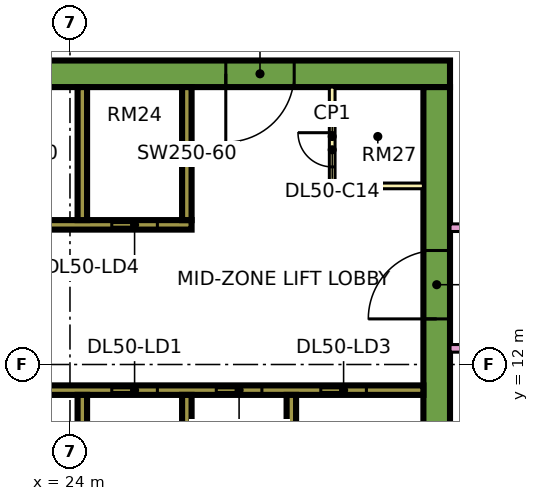
"""IFC4 building model, lengths in metres.
Left out: names, types, materials, properties, quantities, classifications, styles, units other than length and angle.
Written with IfcOpenShell. Run it as: python <this file> out.ifc"""

import sys

from ifc_helpers import new_model, si_unit, direction, frame, frame_2d, origin, place, context, subcontext, project, spatial, rectangle, extrude, element, fill, save


model = new_model("IFC4")
c1 = context("Model", 3, precision=1e-05, world=origin(), true_north=direction((0.0, 1.0)))
c2 = subcontext(c1, "Body", "Model", "MODEL_VIEW")
j1 = project(units=[si_unit("LENGTHUNIT", "METRE"), si_unit("PLANEANGLEUNIT", "RADIAN")], contexts=[c1])
p1 = place(None, origin())
s1 = spatial("IfcSite", under=j1, at=p1, CompositionType="ELEMENT")
p2 = place(p1, origin())
s2 = spatial("IfcBuilding", under=s1, at=p2, CompositionType="ELEMENT")
p3 = place(p2, frame((0.0, 0.0, 215.4)))
s3 = spatial("IfcBuildingStorey", under=s2, at=p3, CompositionType="ELEMENT", Elevation=215.4)
p4 = place(p3, frame((9.0, 19.65, 0.0), z_axis=(0.0, 0.0, 1.0), x_axis=(1.0, 0.0, 0.0)))
e1 = element("IfcWall", 1, at=p4, inside=s3, PredefinedType="SHEAR", context=c2, shape_type="SweptSolid", body=[
    extrude(rectangle(XDim=25.0, YDim=0.7, at=frame_2d((12.5, 0.0))), origin(), (0.0, 0.0, 1.0), 3.75),
])
p5 = place(p4, frame((19.1, 0.0, 0.0)))
e2 = element("IfcOpeningElement", 2, at=p5, cuts=e1, PredefinedType="OPENING", context=c2, shape_type="SweptSolid", body=[
    extrude(rectangle(XDim=1.8, YDim=2.4, at=frame_2d((0.9, 1.2))), frame((0.0, 0.36, 0.0), z_axis=(0.0, -1.0, 0.0), x_axis=(1.0, 0.0, 0.0)), (0.0, 0.0, 1.0), 0.72),
])
p6 = place(p3, frame((33.65, 7.7, 0.0), z_axis=(0.0, 0.0, 1.0), x_axis=(0.0, 1.0, 0.0)))
e3 = element("IfcWall", 3, at=p6, inside=s3, PredefinedType="SHEAR", context=c2, shape_type="SweptSolid", body=[
    extrude(rectangle(XDim=11.6, YDim=0.7, at=frame_2d((5.8, 0.0))), origin(), (0.0, 0.0, 1.0), 3.75),
])
p7 = place(p6, frame((5.5, 0.0, 0.0)))
e4 = element("IfcOpeningElement", 4, at=p7, cuts=e3, PredefinedType="OPENING", context=c2, shape_type="SweptSolid", body=[
    extrude(rectangle(XDim=1.8, YDim=2.4, at=frame_2d((0.9, 1.2))), frame((0.0, 0.36, 0.0), z_axis=(0.0, -1.0, 0.0), x_axis=(1.0, 0.0, 0.0)), (0.0, 0.0, 1.0), 0.72),
])
p8 = place(p3, frame((13.45, 11.325, 0.0), z_axis=(0.0, 0.0, 1.0), x_axis=(1.0, 0.0, 0.0)))
e5 = element("IfcWall", 5, at=p8, inside=s3, PredefinedType="SHEAR", context=c2, shape_type="SweptSolid", body=[
    extrude(rectangle(XDim=19.85, YDim=0.25, at=frame_2d((9.925, 0.0))), origin(), (0.0, 0.0, 1.0), 3.75),
])
p9 = place(p8, frame((11.65, 0.0, 0.0)))
e6 = element("IfcOpeningElement", 6, at=p9, cuts=e5, PredefinedType="OPENING", context=c2, shape_type="SweptSolid", body=[
    extrude(rectangle(XDim=1.2, YDim=2.2, at=frame_2d((0.6, 1.1))), frame((0.0, 0.135, 0.0), z_axis=(0.0, -1.0, 0.0), x_axis=(1.0, 0.0, 0.0)), (0.0, 0.0, 1.0), 0.27),
])
p10 = place(p8, frame((14.4, 0.0, 0.0)))
e7 = element("IfcOpeningElement", 7, at=p10, cuts=e5, PredefinedType="OPENING", context=c2, shape_type="SweptSolid", body=[
    extrude(rectangle(XDim=1.2, YDim=2.2, at=frame_2d((0.6, 1.1))), frame((0.0, 0.135, 0.0), z_axis=(0.0, -1.0, 0.0), x_axis=(1.0, 0.0, 0.0)), (0.0, 0.0, 1.0), 0.27),
])
p11 = place(p8, frame((17.15, 0.0, 0.0)))
e8 = element("IfcOpeningElement", 8, at=p11, cuts=e5, PredefinedType="OPENING", context=c2, shape_type="SweptSolid", body=[
    extrude(rectangle(XDim=1.2, YDim=2.2, at=frame_2d((0.6, 1.1))), frame((0.0, 0.135, 0.0), z_axis=(0.0, -1.0, 0.0), x_axis=(1.0, 0.0, 0.0)), (0.0, 0.0, 1.0), 0.27),
])
p12 = place(p8, frame((1.55, 0.0, 0.0)))
e9 = element("IfcOpeningElement", 9, at=p12, cuts=e5, PredefinedType="OPENING", context=c2, shape_type="SweptSolid", body=[
    extrude(rectangle(XDim=0.9, YDim=2.1, at=frame_2d((0.45, 1.05))), frame((0.0, 0.135, 0.0), z_axis=(0.0, -1.0, 0.0), x_axis=(1.0, 0.0, 0.0)), (0.0, 0.0, 1.0), 0.27),
])
p13 = place(p8, frame((6.925, 0.0, 0.0)))
e10 = element("IfcOpeningElement", 10, at=p13, cuts=e5, PredefinedType="OPENING", context=c2, shape_type="SweptSolid", body=[
    extrude(rectangle(XDim=0.9, YDim=2.1, at=frame_2d((0.45, 1.05))), frame((0.0, 0.135, 0.0), z_axis=(0.0, -1.0, 0.0), x_axis=(1.0, 0.0, 0.0)), (0.0, 0.0, 1.0), 0.27),
])
p14 = place(p3, frame((13.45, 15.675, 0.0), z_axis=(0.0, 0.0, 1.0), x_axis=(1.0, 0.0, 0.0)))
e11 = element("IfcWall", 11, at=p14, inside=s3, PredefinedType="SHEAR", context=c2, shape_type="SweptSolid", body=[
    extrude(rectangle(XDim=13.75, YDim=0.25, at=frame_2d((6.875, 0.0))), origin(), (0.0, 0.0, 1.0), 3.75),
])
p15 = place(p14, frame((11.65, 0.0, 0.0)))
e12 = element("IfcOpeningElement", 12, at=p15, cuts=e11, PredefinedType="OPENING", context=c2, shape_type="SweptSolid", body=[
    extrude(rectangle(XDim=1.2, YDim=2.2, at=frame_2d((0.6, 1.1))), frame((0.0, 0.135, 0.0), z_axis=(0.0, -1.0, 0.0), x_axis=(1.0, 0.0, 0.0)), (0.0, 0.0, 1.0), 0.27),
])
for number, where, z_axis, x_axis in (
    (13, (24.325, 7.7, 0.0), (0.0, 0.0, 1.0), (0.0, 1.0, 0.0)),
    (14, (27.075, 7.7, 0.0), (0.0, 0.0, 1.0), (0.0, 1.0, 0.0)),
    (15, (29.825, 7.7, 0.0), (0.0, 0.0, 1.0), (0.0, 1.0, 0.0)),
    (16, (24.325, 15.8, 0.0), (0.0, 0.0, 1.0), (0.0, 1.0, 0.0)),
    (17, (27.075, 15.8, 0.0), (0.0, 0.0, 1.0), (0.0, 1.0, 0.0)),
):
    element("IfcWall", number, at=place(p3, frame(where, z_axis=z_axis, x_axis=x_axis)), inside=s3, PredefinedType="SHEAR", context=c2, shape_type="SweptSolid", body=[
        extrude(rectangle(XDim=3.5, YDim=0.25, at=frame_2d((1.75, 0.0))), origin(), (0.0, 0.0, 1.0), 3.75),
    ])
p16 = place(p3, frame((30.9, 16.7, 0.0), z_axis=(0.0, 0.0, 1.0), x_axis=(0.0, 1.0, 0.0)))
e18 = element("IfcWall", 18, at=p16, inside=s3, PredefinedType="PARTITIONING", context=c2, shape_type="SweptSolid", body=[
    extrude(rectangle(XDim=2.6, YDim=0.15, at=frame_2d((1.3, 0.0))), origin(), (0.0, 0.0, 1.0), 3.35),
])
p17 = place(p16, frame((0.5, 0.0, 0.0)))
e19 = element("IfcOpeningElement", 19, at=p17, cuts=e18, PredefinedType="OPENING", context=c2, shape_type="SweptSolid", body=[
    extrude(rectangle(XDim=0.9, YDim=2.1, at=frame_2d((0.45, 1.05))), frame((0.0, 0.085, 0.0), z_axis=(0.0, -1.0, 0.0), x_axis=(1.0, 0.0, 0.0)), (0.0, 0.0, 1.0), 0.17),
])
p18 = place(p3, frame((30.9, 16.7, 0.0), z_axis=(0.0, 0.0, 1.0), x_axis=(1.0, 0.0, 0.0)))
e20 = element("IfcWall", 20, at=p18, inside=s3, PredefinedType="PARTITIONING", context=c2, shape_type="SweptSolid", body=[
    extrude(rectangle(XDim=2.4, YDim=0.15, at=frame_2d((1.2, 0.0))), origin(), (0.0, 0.0, 1.0), 3.35),
])
p19 = place(p3, frame((34.0, 12.425, 0.0), z_axis=(0.0, 0.0, 1.0), x_axis=(1.0, 0.0, 0.0)))
e21 = element("IfcWall", 21, at=p19, inside=s3, PredefinedType="PARTITIONING", context=c2, shape_type="SweptSolid", body=[
    extrude(rectangle(XDim=2.426, YDim=0.2, at=frame_2d((1.213, 0.0))), origin(), (0.0, 0.0, 1.0), 3.35),
])
p20 = place(p3, frame((34.0, 15.6, 0.0), z_axis=(0.0, 0.0, 1.0), x_axis=(1.0, 0.0, 0.0)))
e22 = element("IfcWall", 22, at=p20, inside=s3, PredefinedType="PARTITIONING", context=c2, shape_type="SweptSolid", body=[
    extrude(rectangle(XDim=10.35, YDim=0.2, at=frame_2d((5.175, 0.0))), origin(), (0.0, 0.0, 1.0), 3.35),
])
p21 = place(p20, frame((5.6, 0.0, 0.0)))
e23 = element("IfcOpeningElement", 23, at=p21, cuts=e22, PredefinedType="OPENING", context=c2, shape_type="SweptSolid", body=[
    extrude(rectangle(XDim=1.0, YDim=2.1, at=frame_2d((0.5, 1.05))), frame((0.0, 0.11, 0.0), z_axis=(0.0, -1.0, 0.0), x_axis=(1.0, 0.0, 0.0)), (0.0, 0.0, 1.0), 0.22),
])
p22 = place(p20, frame((0.45, 0.0, 0.0)))
e24 = element("IfcOpeningElement", 24, at=p22, cuts=e22, PredefinedType="OPENING", context=c2, shape_type="SweptSolid", body=[
    extrude(rectangle(XDim=1.2, YDim=2.1, at=frame_2d((0.6, 1.05))), frame((0.0, 0.11, 0.0), z_axis=(0.0, -1.0, 0.0), x_axis=(1.0, 0.0, 0.0)), (0.0, 0.0, 1.0), 0.22),
])
p23 = place(p9, origin())
e25 = element("IfcDoor", 25, at=p23, inside=s3, OperationType="DOUBLE_DOOR_SLIDING", PredefinedType="DOOR", context=c2, shape_type="SweptSolid", body=[
    extrude(rectangle(XDim=1.2, YDim=2.2, at=frame_2d((0.6, 1.1))), frame((0.0, 0.025, 0.0), z_axis=(0.0, -1.0, 0.0), x_axis=(1.0, 0.0, 0.0)), (0.0, 0.0, 1.0), 0.05),
])
fill(e6, e25)
p24 = place(p10, origin())
e26 = element("IfcDoor", 26, at=p24, inside=s3, OperationType="DOUBLE_DOOR_SLIDING", PredefinedType="DOOR", context=c2, shape_type="SweptSolid", body=[
    extrude(rectangle(XDim=1.2, YDim=2.2, at=frame_2d((0.6, 1.1))), frame((0.0, 0.025, 0.0), z_axis=(0.0, -1.0, 0.0), x_axis=(1.0, 0.0, 0.0)), (0.0, 0.0, 1.0), 0.05),
])
fill(e7, e26)
p25 = place(p11, origin())
e27 = element("IfcDoor", 27, at=p25, inside=s3, OperationType="DOUBLE_DOOR_SLIDING", PredefinedType="DOOR", context=c2, shape_type="SweptSolid", body=[
    extrude(rectangle(XDim=1.2, YDim=2.2, at=frame_2d((0.6, 1.1))), frame((0.0, 0.025, 0.0), z_axis=(0.0, -1.0, 0.0), x_axis=(1.0, 0.0, 0.0)), (0.0, 0.0, 1.0), 0.05),
])
fill(e8, e27)
p26 = place(p15, origin())
e28 = element("IfcDoor", 28, at=p26, inside=s3, OperationType="DOUBLE_DOOR_SLIDING", PredefinedType="DOOR", context=c2, shape_type="SweptSolid", body=[
    extrude(rectangle(XDim=1.2, YDim=2.2, at=frame_2d((0.6, 1.1))), frame((0.0, 0.025, 0.0), z_axis=(0.0, -1.0, 0.0), x_axis=(1.0, 0.0, 0.0)), (0.0, 0.0, 1.0), 0.05),
])
fill(e12, e28)
p27 = place(p7, origin())
e29 = element("IfcDoor", 29, at=p27, inside=s3, OperationType="DOUBLE_DOOR_SINGLE_SWING", PredefinedType="DOOR", context=c2, shape_type="SweptSolid", body=[
    extrude(rectangle(XDim=1.8, YDim=2.4, at=frame_2d((0.9, 1.2))), frame((0.0, 0.025, 0.0), z_axis=(0.0, -1.0, 0.0), x_axis=(1.0, 0.0, 0.0)), (0.0, 0.0, 1.0), 0.05),
])
fill(e4, e29)
p28 = place(p5, frame((1.8, 0.0, 0.0), z_axis=(0.0, 0.0, 1.0), x_axis=(-1.0, 0.0, 0.0)))
e30 = element("IfcDoor", 30, at=p28, inside=s3, OperationType="DOUBLE_DOOR_SINGLE_SWING", PredefinedType="DOOR", context=c2, shape_type="SweptSolid", body=[
    extrude(rectangle(XDim=1.8, YDim=2.4, at=frame_2d((0.9, 1.2))), frame((0.0, 0.025, 0.0), z_axis=(0.0, -1.0, 0.0), x_axis=(1.0, 0.0, 0.0)), (0.0, 0.0, 1.0), 0.05),
])
fill(e2, e30)
p29 = place(p17, frame((0.9, 0.0, 0.0), z_axis=(0.0, 0.0, 1.0), x_axis=(-1.0, 0.0, 0.0)))
e31 = element("IfcDoor", 31, at=p29, inside=s3, OperationType="SINGLE_SWING_RIGHT", PredefinedType="DOOR", context=c2, shape_type="SweptSolid", body=[
    extrude(rectangle(XDim=0.9, YDim=2.1, at=frame_2d((0.45, 1.05))), frame((0.0, 0.025, 0.0), z_axis=(0.0, -1.0, 0.0), x_axis=(1.0, 0.0, 0.0)), (0.0, 0.0, 1.0), 0.05),
])
fill(e19, e31)
save(model, sys.argv[1])
